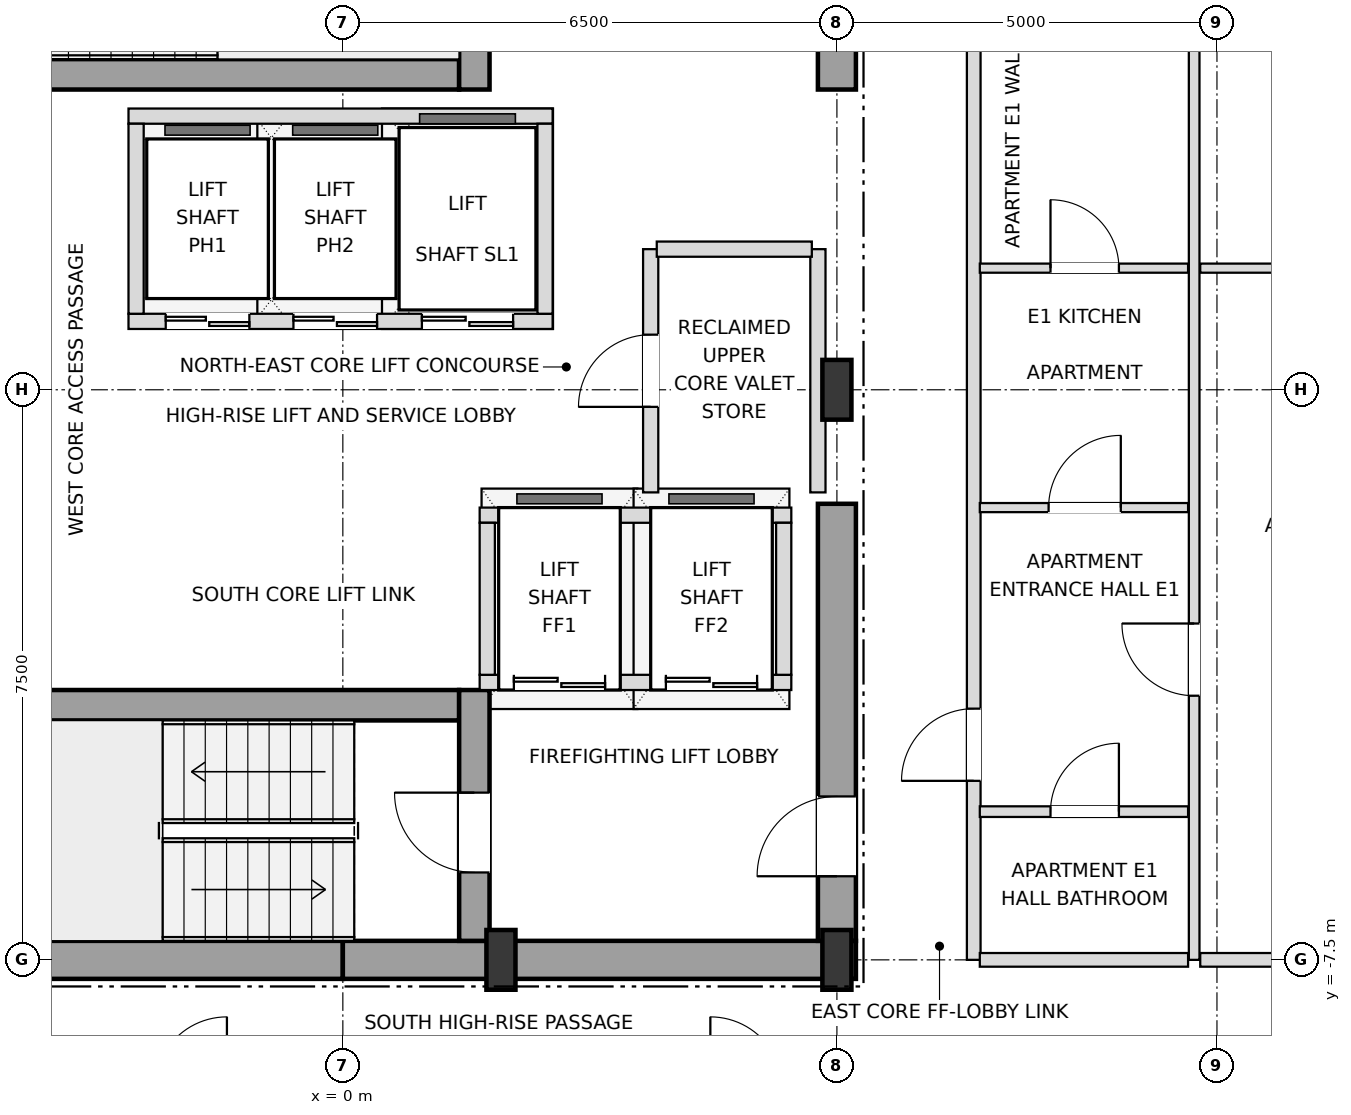
"""IFC4 building model, lengths in metres.
Left out: names, types, materials, properties, quantities, classifications, styles, units other than length and angle.
Written with IfcOpenShell. Run it as: python <this file> out.ifc"""

import sys

from ifc_helpers import new_model, si_unit, direction, frame, frame_2d, origin, origin_2d, place, context, subcontext, project, spatial, rectangle, i_section, extrude, element, fill, save


model = new_model("IFC4")
c1 = context("Model", 3, precision=1e-05, world=origin(), true_north=direction((0.0, 1.0)))
c2 = subcontext(c1, "Body", "Model", "MODEL_VIEW")
j1 = project(units=[si_unit("LENGTHUNIT", "METRE"), si_unit("PLANEANGLEUNIT", "RADIAN")], contexts=[c1])
p1 = place(None, origin())
s1 = spatial("IfcSite", under=j1, at=p1, CompositionType="ELEMENT")
p2 = place(p1, origin())
s2 = spatial("IfcBuilding", under=s1, at=p2, CompositionType="ELEMENT")
p3 = place(p2, frame((0.0, 0.0, 233.1)))
s3 = spatial("IfcBuildingStorey", under=s2, at=p3, CompositionType="ELEMENT", Elevation=233.1)
for number, where, z_axis, x_axis in (
    (1, (2.08, -7.5, 0.0), (0.0, 0.0, 1.0), (1.0, 0.0, 0.0)),
    (2, (6.5, -7.5, 0.0), (0.0, 0.0, 1.0), (1.0, 0.0, 0.0)),
    (3, (6.5, 0.0, 0.0), (0.0, 0.0, 1.0), (1.0, 0.0, 0.0)),
):
    element("IfcColumn", number, at=place(p3, frame(where, z_axis=z_axis, x_axis=x_axis)), inside=s3, PredefinedType="COLUMN", context=c2, shape_type="SweptSolid", body=[
        extrude(i_section(OverallWidth=0.382, OverallDepth=0.786, WebThickness=0.02, FlangeThickness=0.033, at=origin_2d()), origin(), (0.0, 0.0, 1.0), 3.6),
    ])
for number, where, z_axis, x_axis in (
    (4, (-6.75, -7.5, 0.0), (0.0, 0.0, 1.0), (1.0, 0.0, 0.0)),
    (5, (0.0, -7.5, 0.0), (0.0, 0.0, 1.0), (1.0, 0.0, 0.0)),
):
    element("IfcWall", number, at=place(p3, frame(where, z_axis=z_axis, x_axis=x_axis)), inside=s3, PredefinedType="SHEAR", context=c2, shape_type="SweptSolid", body=[
        extrude(rectangle(XDim=6.75, YDim=0.5, at=frame_2d((3.375, 0.0))), origin(), (0.0, 0.0, 1.0), 3.38),
    ])
p4 = place(p3, frame((6.5, -7.25, 0.0), z_axis=(0.0, 0.0, 1.0), x_axis=(0.0, 1.0, 0.0)))
e6 = element("IfcWall", 6, at=p4, inside=s3, PredefinedType="SHEAR", context=c2, shape_type="SweptSolid", body=[
    extrude(rectangle(XDim=5.75, YDim=0.5, at=frame_2d((2.875, 0.0))), origin(), (0.0, 0.0, 1.0), 3.38),
])
p5 = place(p4, frame((0.85, 0.0, 0.0)))
e7 = element("IfcOpeningElement", 7, at=p5, cuts=e6, PredefinedType="OPENING", context=c2, shape_type="SweptSolid", body=[
    extrude(rectangle(XDim=1.05, YDim=2.15, at=frame_2d((0.525, 1.075))), frame((0.0, 0.26, 0.0), z_axis=(0.0, -1.0, 0.0), x_axis=(1.0, 0.0, 0.0)), (0.0, 0.0, 1.0), 0.52),
])
p6 = place(p3, frame((6.5, 3.95, 0.0), z_axis=(0.0, 0.0, 1.0), x_axis=(0.0, 1.0, 0.0)))
e8 = element("IfcWall", 8, at=p6, inside=s3, PredefinedType="SHEAR", context=c2, shape_type="SweptSolid", body=[
    extrude(rectangle(XDim=3.3, YDim=0.5, at=frame_2d((1.65, 0.0))), origin(), (0.0, 0.0, 1.0), 3.38),
])
p7 = place(p3, frame((-6.25, -4.15, 0.0), z_axis=(0.0, 0.0, 1.0), x_axis=(1.0, 0.0, 0.0)))
e9 = element("IfcWall", 9, at=p7, inside=s3, PredefinedType="SHEAR", context=c2, shape_type="SweptSolid", body=[
    extrude(rectangle(XDim=7.78, YDim=0.4, at=frame_2d((3.89, 0.0))), origin(), (0.0, 0.0, 1.0), 3.38),
])
p8 = place(p3, frame((1.73, -7.25, 0.0), z_axis=(0.0, 0.0, 1.0), x_axis=(0.0, 1.0, 0.0)))
e10 = element("IfcWall", 10, at=p8, inside=s3, PredefinedType="SHEAR", context=c2, shape_type="SweptSolid", body=[
    extrude(rectangle(XDim=3.3, YDim=0.4, at=frame_2d((1.65, 0.0))), origin(), (0.0, 0.0, 1.0), 3.38),
])
p9 = place(p8, frame((0.9, 0.0, 0.0)))
e11 = element("IfcOpeningElement", 11, at=p9, cuts=e10, PredefinedType="OPENING", context=c2, shape_type="SweptSolid", body=[
    extrude(rectangle(XDim=1.05, YDim=2.15, at=frame_2d((0.525, 1.075))), frame((0.0, 0.21, 0.0), z_axis=(0.0, -1.0, 0.0), x_axis=(1.0, 0.0, 0.0)), (0.0, 0.0, 1.0), 0.42),
])
p10 = place(p3, frame((-5.55, 4.15, 0.0), z_axis=(0.0, 0.0, 1.0), x_axis=(1.0, 0.0, 0.0)))
e12 = element("IfcWall", 12, at=p10, inside=s3, PredefinedType="SHEAR", context=c2, shape_type="SweptSolid", body=[
    extrude(rectangle(XDim=7.08, YDim=0.4, at=frame_2d((3.54, 0.0))), origin(), (0.0, 0.0, 1.0), 3.38),
])
p11 = place(p3, frame((1.73, 3.95, 0.0), z_axis=(0.0, 0.0, 1.0), x_axis=(0.0, 1.0, 0.0)))
e13 = element("IfcWall", 13, at=p11, inside=s3, PredefinedType="SHEAR", context=c2, shape_type="SweptSolid", body=[
    extrude(rectangle(XDim=3.3, YDim=0.4, at=frame_2d((1.65, 0.0))), origin(), (0.0, 0.0, 1.0), 3.38),
])
p12 = place(p3, frame((-2.82, 0.9, 0.0), z_axis=(0.0, 0.0, 1.0), x_axis=(1.0, 0.0, 0.0)))
e14 = element("IfcWall", 14, at=p12, inside=s3, PredefinedType="SOLIDWALL", context=c2, shape_type="SweptSolid", body=[
    extrude(rectangle(XDim=5.58, YDim=0.2, at=frame_2d((2.79, 0.0))), origin(), (0.0, 0.0, 1.0), 3.38),
])
p13 = place(p12, frame((0.49, 0.0, 0.0)))
e15 = element("IfcOpeningElement", 15, at=p13, cuts=e14, PredefinedType="OPENING", context=c2, shape_type="SweptSolid", body=[
    extrude(rectangle(XDim=1.1, YDim=2.15, at=frame_2d((0.55, 1.075))), frame((0.0, 0.11, 0.0), z_axis=(0.0, -1.0, 0.0), x_axis=(1.0, 0.0, 0.0)), (0.0, 0.0, 1.0), 0.22),
])
p14 = place(p12, frame((2.17, 0.0, 0.0)))
e16 = element("IfcOpeningElement", 16, at=p14, cuts=e14, PredefinedType="OPENING", context=c2, shape_type="SweptSolid", body=[
    extrude(rectangle(XDim=1.1, YDim=2.15, at=frame_2d((0.55, 1.075))), frame((0.0, 0.11, 0.0), z_axis=(0.0, -1.0, 0.0), x_axis=(1.0, 0.0, 0.0)), (0.0, 0.0, 1.0), 0.22),
])
p15 = place(p12, frame((3.86, 0.0, 0.0)))
e17 = element("IfcOpeningElement", 17, at=p15, cuts=e14, PredefinedType="OPENING", context=c2, shape_type="SweptSolid", body=[
    extrude(rectangle(XDim=1.2, YDim=2.2, at=frame_2d((0.6, 1.1))), frame((0.0, 0.11, 0.0), z_axis=(0.0, -1.0, 0.0), x_axis=(1.0, 0.0, 0.0)), (0.0, 0.0, 1.0), 0.22),
])
p16 = place(p3, frame((-2.82, 3.6, 0.0), z_axis=(0.0, 0.0, 1.0), x_axis=(1.0, 0.0, 0.0)))
e18 = element("IfcWall", 18, at=p16, inside=s3, PredefinedType="SOLIDWALL", context=c2, shape_type="SweptSolid", body=[
    extrude(rectangle(XDim=5.58, YDim=0.2, at=frame_2d((2.79, 0.0))), origin(), (0.0, 0.0, 1.0), 3.38),
])
for number, where, z_axis, x_axis in (
    (19, (-2.72, 1.0, 0.0), (0.0, 0.0, 1.0), (0.0, 1.0, 0.0)),
    (20, (2.66, 1.0, 0.0), (0.0, 0.0, 1.0), (0.0, 1.0, 0.0)),
):
    element("IfcWall", number, at=place(p3, frame(where, z_axis=z_axis, x_axis=x_axis)), inside=s3, PredefinedType="SOLIDWALL", context=c2, shape_type="SweptSolid", body=[
        extrude(rectangle(XDim=2.5, YDim=0.2, at=frame_2d((1.25, 0.0))), origin(), (0.0, 0.0, 1.0), 3.38),
    ])
p17 = place(p3, frame((1.8, -3.85, 0.0), z_axis=(0.0, 0.0, 1.0), x_axis=(1.0, 0.0, 0.0)))
e21 = element("IfcWall", 21, at=p17, inside=s3, PredefinedType="SOLIDWALL", context=c2, shape_type="SweptSolid", body=[
    extrude(rectangle(XDim=4.1, YDim=0.2, at=frame_2d((2.05, 0.0))), origin(), (0.0, 0.0, 1.0), 3.38),
])
p18 = place(p17, frame((0.45, 0.0, 0.0)))
e22 = element("IfcOpeningElement", 22, at=p18, cuts=e21, PredefinedType="OPENING", context=c2, shape_type="SweptSolid", body=[
    extrude(rectangle(XDim=1.2, YDim=2.2, at=frame_2d((0.6, 1.1))), frame((0.0, 0.11, 0.0), z_axis=(0.0, -1.0, 0.0), x_axis=(1.0, 0.0, 0.0)), (0.0, 0.0, 1.0), 0.22),
])
p19 = place(p17, frame((2.45, 0.0, 0.0)))
e23 = element("IfcOpeningElement", 23, at=p19, cuts=e21, PredefinedType="OPENING", context=c2, shape_type="SweptSolid", body=[
    extrude(rectangle(XDim=1.2, YDim=2.2, at=frame_2d((0.6, 1.1))), frame((0.0, 0.11, 0.0), z_axis=(0.0, -1.0, 0.0), x_axis=(1.0, 0.0, 0.0)), (0.0, 0.0, 1.0), 0.22),
])
p20 = place(p3, frame((1.8, -1.65, 0.0), z_axis=(0.0, 0.0, 1.0), x_axis=(1.0, 0.0, 0.0)))
e24 = element("IfcWall", 24, at=p20, inside=s3, PredefinedType="SOLIDWALL", context=c2, shape_type="SweptSolid", body=[
    extrude(rectangle(XDim=4.1, YDim=0.2, at=frame_2d((2.05, 0.0))), origin(), (0.0, 0.0, 1.0), 3.38),
])
for number, where, z_axis, x_axis in (
    (25, (1.9, -3.75, 0.0), (0.0, 0.0, 1.0), (0.0, 1.0, 0.0)),
    (26, (5.8, -3.75, 0.0), (0.0, 0.0, 1.0), (0.0, 1.0, 0.0)),
):
    element("IfcWall", number, at=place(p3, frame(where, z_axis=z_axis, x_axis=x_axis)), inside=s3, PredefinedType="SOLIDWALL", context=c2, shape_type="SweptSolid", body=[
        extrude(rectangle(XDim=2.0, YDim=0.2, at=frame_2d((1.0, 0.0))), origin(), (0.0, 0.0, 1.0), 3.38),
    ])
p21 = place(p3, frame((4.05, -1.35, 0.0), z_axis=(0.0, 0.0, 1.0), x_axis=(0.0, 1.0, 0.0)))
e27 = element("IfcWall", 27, at=p21, inside=s3, PredefinedType="SOLIDWALL", context=c2, shape_type="SweptSolid", body=[
    extrude(rectangle(XDim=3.2, YDim=0.2, at=frame_2d((1.6, 0.0))), origin(), (0.0, 0.0, 1.0), 3.38),
])
p22 = place(p21, frame((1.125, 0.0, 0.0)))
e28 = element("IfcOpeningElement", 28, at=p22, cuts=e27, PredefinedType="OPENING", context=c2, shape_type="SweptSolid", body=[
    extrude(rectangle(XDim=0.95, YDim=2.15, at=frame_2d((0.475, 1.075))), frame((0.0, 0.11, 0.0), z_axis=(0.0, -1.0, 0.0), x_axis=(1.0, 0.0, 0.0)), (0.0, 0.0, 1.0), 0.22),
])
p23 = place(p3, frame((6.25, -1.35, 0.0), z_axis=(0.0, 0.0, 1.0), x_axis=(0.0, 1.0, 0.0)))
e29 = element("IfcWall", 29, at=p23, inside=s3, PredefinedType="SOLIDWALL", context=c2, shape_type="SweptSolid", body=[
    extrude(rectangle(XDim=3.2, YDim=0.2, at=frame_2d((1.6, 0.0))), origin(), (0.0, 0.0, 1.0), 3.38),
])
p24 = place(p3, frame((8.3, -7.5, 0.0), z_axis=(0.0, 0.0, 1.0), x_axis=(0.0, 1.0, 0.0)))
e30 = element("IfcWall", 30, at=p24, inside=s3, PredefinedType="PARTITIONING", context=c2, shape_type="SweptSolid", body=[
    extrude(rectangle(XDim=15.0, YDim=0.18, at=frame_2d((7.5, 0.0))), origin(), (0.0, 0.0, 1.0), 3.38),
])
p25 = place(p24, frame((2.355, 0.0, 0.0)))
e31 = element("IfcOpeningElement", 31, at=p25, cuts=e30, PredefinedType="OPENING", context=c2, shape_type="SweptSolid", body=[
    extrude(rectangle(XDim=0.95, YDim=2.15, at=frame_2d((0.475, 1.075))), frame((0.0, 0.1, 0.0), z_axis=(0.0, -1.0, 0.0), x_axis=(1.0, 0.0, 0.0)), (0.0, 0.0, 1.0), 0.2),
])
p26 = place(p3, frame((11.2, -7.5, 0.0), z_axis=(0.0, 0.0, 1.0), x_axis=(0.0, 1.0, 0.0)))
e32 = element("IfcWall", 32, at=p26, inside=s3, PredefinedType="PARTITIONING", context=c2, shape_type="SweptSolid", body=[
    extrude(rectangle(XDim=15.0, YDim=0.14, at=frame_2d((7.5, 0.0))), origin(), (0.0, 0.0, 1.0), 3.38),
])
p27 = place(p26, frame((3.475, 0.0, 0.0)))
e33 = element("IfcOpeningElement", 33, at=p27, cuts=e32, PredefinedType="OPENING", context=c2, shape_type="SweptSolid", body=[
    extrude(rectangle(XDim=0.95, YDim=2.1, at=frame_2d((0.475, 1.05))), frame((0.0, 0.08, 0.0), z_axis=(0.0, -1.0, 0.0), x_axis=(1.0, 0.0, 0.0)), (0.0, 0.0, 1.0), 0.16),
])
p28 = place(p3, frame((8.38, -7.5, 0.0), z_axis=(0.0, 0.0, 1.0), x_axis=(1.0, 0.0, 0.0)))
e34 = element("IfcWall", 34, at=p28, inside=s3, PredefinedType="PARTITIONING", context=c2, shape_type="SweptSolid", body=[
    extrude(rectangle(XDim=2.74, YDim=0.18, at=frame_2d((1.37, 0.0))), origin(), (0.0, 0.0, 1.0), 2.826),
])
p29 = place(p3, frame((11.28, -7.5, 0.0), z_axis=(0.0, 0.0, 1.0), x_axis=(1.0, 0.0, 0.0)))
e35 = element("IfcWall", 35, at=p29, inside=s3, PredefinedType="PARTITIONING", context=c2, shape_type="SweptSolid", body=[
    extrude(rectangle(XDim=5.62, YDim=0.18, at=frame_2d((2.81, 0.0))), origin(), (0.0, 0.0, 1.0), 2.826),
])
p30 = place(p3, frame((8.38, -5.55, 0.0), z_axis=(0.0, 0.0, 1.0), x_axis=(1.0, 0.0, 0.0)))
e36 = element("IfcWall", 36, at=p30, inside=s3, PredefinedType="PARTITIONING", context=c2, shape_type="SweptSolid", body=[
    extrude(rectangle(XDim=2.74, YDim=0.14, at=frame_2d((1.37, 0.0))), origin(), (0.0, 0.0, 1.0), 3.38),
])
p31 = place(p30, frame((0.93, 0.0, 0.0)))
e37 = element("IfcOpeningElement", 37, at=p31, cuts=e36, PredefinedType="OPENING", context=c2, shape_type="SweptSolid", body=[
    extrude(rectangle(XDim=0.9, YDim=2.1, at=frame_2d((0.45, 1.05))), frame((0.0, 0.08, 0.0), z_axis=(0.0, -1.0, 0.0), x_axis=(1.0, 0.0, 0.0)), (0.0, 0.0, 1.0), 0.16),
])
p32 = place(p3, frame((8.38, -1.55, 0.0), z_axis=(0.0, 0.0, 1.0), x_axis=(1.0, 0.0, 0.0)))
e38 = element("IfcWall", 38, at=p32, inside=s3, PredefinedType="PARTITIONING", context=c2, shape_type="SweptSolid", body=[
    extrude(rectangle(XDim=2.74, YDim=0.12, at=frame_2d((1.37, 0.0))), origin(), (0.0, 0.0, 1.0), 3.38),
])
p33 = place(p32, frame((0.905, 0.0, 0.0)))
e39 = element("IfcOpeningElement", 39, at=p33, cuts=e38, PredefinedType="OPENING", context=c2, shape_type="SweptSolid", body=[
    extrude(rectangle(XDim=0.95, YDim=2.1, at=frame_2d((0.475, 1.05))), frame((0.0, 0.07, 0.0), z_axis=(0.0, -1.0, 0.0), x_axis=(1.0, 0.0, 0.0)), (0.0, 0.0, 1.0), 0.14),
])
p34 = place(p3, frame((8.38, 1.6, 0.0), z_axis=(0.0, 0.0, 1.0), x_axis=(1.0, 0.0, 0.0)))
e40 = element("IfcWall", 40, at=p34, inside=s3, PredefinedType="PARTITIONING", context=c2, shape_type="SweptSolid", body=[
    extrude(rectangle(XDim=2.74, YDim=0.12, at=frame_2d((1.37, 0.0))), origin(), (0.0, 0.0, 1.0), 3.38),
])
p35 = place(p34, frame((0.93, 0.0, 0.0)))
e41 = element("IfcOpeningElement", 41, at=p35, cuts=e40, PredefinedType="OPENING", context=c2, shape_type="SweptSolid", body=[
    extrude(rectangle(XDim=0.9, YDim=2.1, at=frame_2d((0.45, 1.05))), frame((0.0, 0.07, 0.0), z_axis=(0.0, -1.0, 0.0), x_axis=(1.0, 0.0, 0.0)), (0.0, 0.0, 1.0), 0.14),
])
p36 = place(p3, frame((11.28, 1.6, 0.0), z_axis=(0.0, 0.0, 1.0), x_axis=(1.0, 0.0, 0.0)))
e42 = element("IfcWall", 42, at=p36, inside=s3, PredefinedType="PARTITIONING", context=c2, shape_type="SweptSolid", body=[
    extrude(rectangle(XDim=5.54, YDim=0.12, at=frame_2d((2.77, 0.0))), origin(), (0.0, 0.0, 1.0), 3.018),
])
p37 = place(p36, frame((2.33, 0.0, 0.0)))
e43 = element("IfcOpeningElement", 43, at=p37, cuts=e42, PredefinedType="OPENING", context=c2, shape_type="SweptSolid", body=[
    extrude(rectangle(XDim=0.9, YDim=2.1, at=frame_2d((0.45, 1.05))), frame((0.0, 0.07, 0.0), z_axis=(0.0, -1.0, 0.0), x_axis=(1.0, 0.0, 0.0)), (0.0, 0.0, 1.0), 0.14),
])
p38 = place(p3, frame((4.13, 1.85, 0.0), z_axis=(0.0, 0.0, 1.0), x_axis=(1.0, 0.0, 0.0)))
e44 = element("IfcWall", 44, at=p38, inside=s3, PredefinedType="SOLIDWALL", context=c2, shape_type="SweptSolid", body=[
    extrude(rectangle(XDim=2.04, YDim=0.2, at=frame_2d((1.02, 0.0))), origin(), (0.0, 0.0, 1.0), 3.38),
])
p39 = place(p5, origin())
e45 = element("IfcDoor", 45, at=p39, inside=s3, OperationType="SINGLE_SWING_LEFT", PredefinedType="DOOR", context=c2, shape_type="SweptSolid", body=[
    extrude(rectangle(XDim=1.05, YDim=2.15, at=frame_2d((0.525, 1.075))), frame((0.0, 0.025, 0.0), z_axis=(0.0, -1.0, 0.0), x_axis=(1.0, 0.0, 0.0)), (0.0, 0.0, 1.0), 0.05),
])
fill(e7, e45)
p40 = place(p9, origin())
e46 = element("IfcDoor", 46, at=p40, inside=s3, OperationType="SINGLE_SWING_RIGHT", PredefinedType="DOOR", context=c2, shape_type="SweptSolid", body=[
    extrude(rectangle(XDim=1.05, YDim=2.15, at=frame_2d((0.525, 1.075))), frame((0.0, 0.025, 0.0), z_axis=(0.0, -1.0, 0.0), x_axis=(1.0, 0.0, 0.0)), (0.0, 0.0, 1.0), 0.05),
])
fill(e11, e46)
p41 = place(p13, origin())
e47 = element("IfcDoor", 47, at=p41, inside=s3, OperationType="DOUBLE_DOOR_SLIDING", PredefinedType="DOOR", context=c2, shape_type="SweptSolid", body=[
    extrude(rectangle(XDim=1.1, YDim=2.15, at=frame_2d((0.55, 1.075))), frame((0.0, 0.025, 0.0), z_axis=(0.0, -1.0, 0.0), x_axis=(1.0, 0.0, 0.0)), (0.0, 0.0, 1.0), 0.05),
])
fill(e15, e47)
p42 = place(p14, origin())
e48 = element("IfcDoor", 48, at=p42, inside=s3, OperationType="DOUBLE_DOOR_SLIDING", PredefinedType="DOOR", context=c2, shape_type="SweptSolid", body=[
    extrude(rectangle(XDim=1.1, YDim=2.15, at=frame_2d((0.55, 1.075))), frame((0.0, 0.025, 0.0), z_axis=(0.0, -1.0, 0.0), x_axis=(1.0, 0.0, 0.0)), (0.0, 0.0, 1.0), 0.05),
])
fill(e16, e48)
p43 = place(p15, origin())
e49 = element("IfcDoor", 49, at=p43, inside=s3, OperationType="DOUBLE_DOOR_SLIDING", PredefinedType="DOOR", context=c2, shape_type="SweptSolid", body=[
    extrude(rectangle(XDim=1.2, YDim=2.2, at=frame_2d((0.6, 1.1))), frame((0.0, 0.025, 0.0), z_axis=(0.0, -1.0, 0.0), x_axis=(1.0, 0.0, 0.0)), (0.0, 0.0, 1.0), 0.05),
])
fill(e17, e49)
p44 = place(p18, origin())
e50 = element("IfcDoor", 50, at=p44, inside=s3, OperationType="DOUBLE_DOOR_SLIDING", PredefinedType="DOOR", context=c2, shape_type="SweptSolid", body=[
    extrude(rectangle(XDim=1.2, YDim=2.2, at=frame_2d((0.6, 1.1))), frame((0.0, 0.025, 0.0), z_axis=(0.0, -1.0, 0.0), x_axis=(1.0, 0.0, 0.0)), (0.0, 0.0, 1.0), 0.05),
])
fill(e22, e50)
p45 = place(p19, origin())
e51 = element("IfcDoor", 51, at=p45, inside=s3, OperationType="DOUBLE_DOOR_SLIDING", PredefinedType="DOOR", context=c2, shape_type="SweptSolid", body=[
    extrude(rectangle(XDim=1.2, YDim=2.2, at=frame_2d((0.6, 1.1))), frame((0.0, 0.025, 0.0), z_axis=(0.0, -1.0, 0.0), x_axis=(1.0, 0.0, 0.0)), (0.0, 0.0, 1.0), 0.05),
])
fill(e23, e51)
p46 = place(p22, origin())
e52 = element("IfcDoor", 52, at=p46, inside=s3, OperationType="SINGLE_SWING_LEFT", PredefinedType="DOOR", context=c2, shape_type="SweptSolid", body=[
    extrude(rectangle(XDim=0.95, YDim=2.15, at=frame_2d((0.475, 1.075))), frame((0.0, 0.025, 0.0), z_axis=(0.0, -1.0, 0.0), x_axis=(1.0, 0.0, 0.0)), (0.0, 0.0, 1.0), 0.05),
])
fill(e28, e52)
p47 = place(p31, origin())
e53 = element("IfcDoor", 53, at=p47, inside=s3, OperationType="SINGLE_SWING_RIGHT", PredefinedType="DOOR", context=c2, shape_type="SweptSolid", body=[
    extrude(rectangle(XDim=0.9, YDim=2.1, at=frame_2d((0.45, 1.05))), frame((0.0, 0.025, 0.0), z_axis=(0.0, -1.0, 0.0), x_axis=(1.0, 0.0, 0.0)), (0.0, 0.0, 1.0), 0.05),
])
fill(e37, e53)
p48 = place(p25, origin())
e54 = element("IfcDoor", 54, at=p48, inside=s3, OperationType="SINGLE_SWING_LEFT", PredefinedType="DOOR", context=c2, shape_type="SweptSolid", body=[
    extrude(rectangle(XDim=0.95, YDim=2.15, at=frame_2d((0.475, 1.075))), frame((0.0, 0.025, 0.0), z_axis=(0.0, -1.0, 0.0), x_axis=(1.0, 0.0, 0.0)), (0.0, 0.0, 1.0), 0.05),
])
fill(e31, e54)
p49 = place(p33, origin())
e55 = element("IfcDoor", 55, at=p49, inside=s3, OperationType="SINGLE_SWING_RIGHT", PredefinedType="DOOR", context=c2, shape_type="SweptSolid", body=[
    extrude(rectangle(XDim=0.95, YDim=2.1, at=frame_2d((0.475, 1.05))), frame((0.0, 0.025, 0.0), z_axis=(0.0, -1.0, 0.0), x_axis=(1.0, 0.0, 0.0)), (0.0, 0.0, 1.0), 0.05),
])
fill(e39, e55)
p50 = place(p35, origin())
e56 = element("IfcDoor", 56, at=p50, inside=s3, OperationType="SINGLE_SWING_LEFT", PredefinedType="DOOR", context=c2, shape_type="SweptSolid", body=[
    extrude(rectangle(XDim=0.9, YDim=2.1, at=frame_2d((0.45, 1.05))), frame((0.0, 0.025, 0.0), z_axis=(0.0, -1.0, 0.0), x_axis=(1.0, 0.0, 0.0)), (0.0, 0.0, 1.0), 0.05),
])
fill(e41, e56)
p51 = place(p27, origin())
e57 = element("IfcDoor", 57, at=p51, inside=s3, OperationType="SINGLE_SWING_RIGHT", PredefinedType="DOOR", context=c2, shape_type="SweptSolid", body=[
    extrude(rectangle(XDim=0.95, YDim=2.1, at=frame_2d((0.475, 1.05))), frame((0.0, 0.025, 0.0), z_axis=(0.0, -1.0, 0.0), x_axis=(1.0, 0.0, 0.0)), (0.0, 0.0, 1.0), 0.05),
])
fill(e33, e57)
save(model, sys.argv[1])
